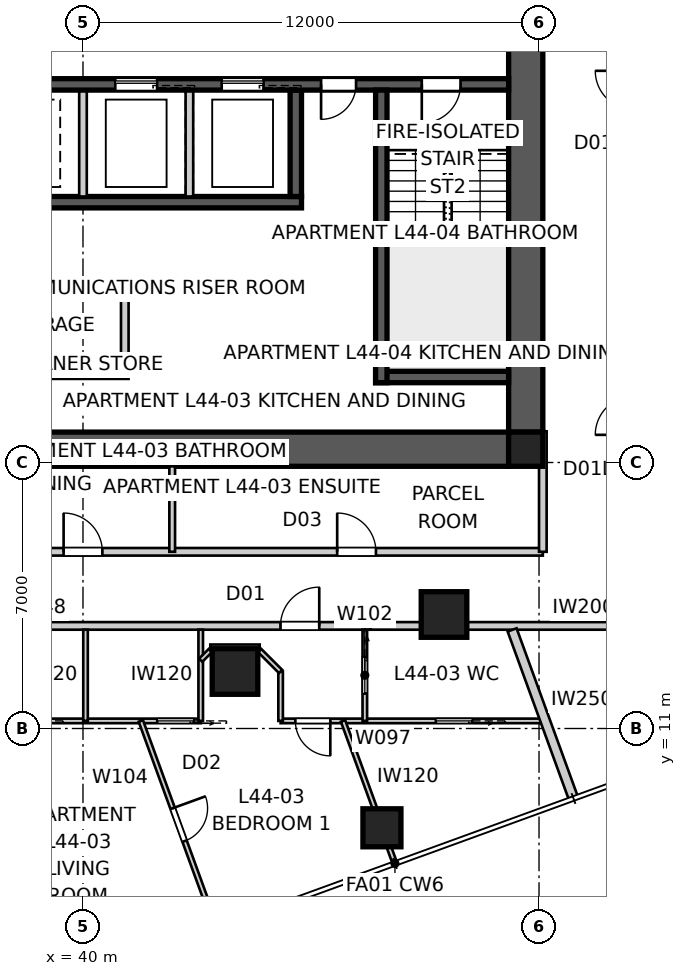
"""IFC4 building model, lengths in metres.
Left out: names, types, materials, properties, quantities, classifications, styles, units other than length and angle.
Written with IfcOpenShell. Run it as: python <this file> out.ifc"""

import sys

from ifc_helpers import new_model, si_unit, direction, frame, frame_2d, origin, origin_2d, place, context, subcontext, project, spatial, polyline, rectangle, outline, extrude, element, fill, save


model = new_model("IFC4")
c1 = context("Model", 3, precision=1e-05, world=origin(), true_north=direction((0.0, 1.0)))
c2 = subcontext(c1, "Body", "Model", "MODEL_VIEW")
j1 = project(units=[si_unit("LENGTHUNIT", "METRE"), si_unit("PLANEANGLEUNIT", "RADIAN")], contexts=[c1])
p1 = place(None, origin())
s1 = spatial("IfcSite", under=j1, at=p1, CompositionType="ELEMENT")
p2 = place(p1, origin())
s2 = spatial("IfcBuilding", under=s1, at=p2, CompositionType="ELEMENT")
p3 = place(p2, frame((0.0, 0.0, 160.8)))
s3 = spatial("IfcBuildingStorey", under=s2, at=p3, CompositionType="ELEMENT", Elevation=160.8)
p4 = place(p3, frame((51.2, 18.35, 0.0), z_axis=(0.0, 0.0, 1.0), x_axis=(-1.0, 0.0, 0.0)))
e1 = element("IfcWall", 1, at=p4, inside=s3, PredefinedType="SHEAR", context=c2, shape_type="SweptSolid", body=[
    extrude(outline(polyline([(0.0, -0.45), (22.4, -0.45), (22.4, -0.025), (22.85, -0.025), (22.85, 0.025), (22.4, 0.025), (22.4, 0.45), (0.0, 0.45), (0.0, 0.025), (-0.45, 0.025), (-0.45, -0.025), (0.0, -0.025), (0.0, -0.45)])), origin(), (0.0, 0.0, 1.0), 3.4),
])
p5 = place(p3, frame((51.65, 18.8, 0.0), z_axis=(0.0, 0.0, 1.0), x_axis=(0.0, 1.0, 0.0)))
e2 = element("IfcWall", 2, at=p5, inside=s3, PredefinedType="SHEAR", context=c2, shape_type="SweptSolid", body=[
    extrude(outline(polyline([(0.0, -0.45), (22.4, -0.45), (22.4, -0.025), (22.85, -0.025), (22.85, 0.025), (22.4, 0.025), (22.4, 0.45), (0.0, 0.45), (0.0, 0.025), (-0.45, 0.025), (-0.45, -0.025), (0.0, -0.025), (0.0, -0.45)])), origin(), (0.0, 0.0, 1.0), 3.4),
])
p6 = place(p5, frame((11.14, 0.0, 0.0)))
e3 = element("IfcOpeningElement", 3, at=p6, cuts=e2, PredefinedType="OPENING", context=c2, shape_type="SweptSolid", body=[
    extrude(rectangle(XDim=1.02, YDim=2.4, at=frame_2d((0.51, 1.2))), frame((0.0, 0.46, 0.0), z_axis=(0.0, -1.0, 0.0), x_axis=(1.0, 0.0, 0.0)), (0.0, 0.0, 1.0), 0.92),
])
p7 = place(p3, frame((51.2, 27.95, 0.0), z_axis=(0.0, 0.0, 1.0), x_axis=(-1.0, 0.0, 0.0)))
e4 = element("IfcWall", 4, at=p7, inside=s3, PredefinedType="SHEAR", context=c2, shape_type="SweptSolid", body=[
    extrude(rectangle(XDim=22.4, YDim=0.3, at=frame_2d((11.2, 0.0))), origin(), (0.0, 0.0, 1.0), 3.4),
])
p8 = place(p7, frame((19.04, 0.0, 0.0)))
e5 = element("IfcOpeningElement", 5, at=p8, cuts=e4, PredefinedType="OPENING", context=c2, shape_type="SweptSolid", body=[
    extrude(rectangle(XDim=0.92, YDim=2.1, at=frame_2d((0.46, 1.05))), frame((0.0, 0.16, 0.0), z_axis=(0.0, -1.0, 0.0), x_axis=(1.0, 0.0, 0.0)), (0.0, 0.0, 1.0), 0.32),
])
p9 = place(p7, frame((1.265, 0.0, 0.0)))
e6 = element("IfcOpeningElement", 6, at=p9, cuts=e4, PredefinedType="OPENING", context=c2, shape_type="SweptSolid", body=[
    extrude(rectangle(XDim=1.02, YDim=2.1, at=frame_2d((0.51, 1.05))), frame((0.0, 0.16, 0.0), z_axis=(0.0, -1.0, 0.0), x_axis=(1.0, 0.0, 0.0)), (0.0, 0.0, 1.0), 0.32),
])
p10 = place(p7, frame((4.015, 0.0, 0.0)))
e7 = element("IfcOpeningElement", 7, at=p10, cuts=e4, PredefinedType="OPENING", context=c2, shape_type="SweptSolid", body=[
    extrude(rectangle(XDim=0.92, YDim=2.1, at=frame_2d((0.46, 1.05))), frame((0.0, 0.16, 0.0), z_axis=(0.0, -1.0, 0.0), x_axis=(1.0, 0.0, 0.0)), (0.0, 0.0, 1.0), 0.32),
])
p11 = place(p7, frame((6.45, 0.0, 0.0)))
e8 = element("IfcOpeningElement", 8, at=p11, cuts=e4, PredefinedType="OPENING", context=c2, shape_type="SweptSolid", body=[
    extrude(rectangle(XDim=1.1, YDim=2.1, at=frame_2d((0.55, 1.05))), frame((0.0, 0.16, 0.0), z_axis=(0.0, -1.0, 0.0), x_axis=(1.0, 0.0, 0.0)), (0.0, 0.0, 1.0), 0.32),
])
p12 = place(p7, frame((9.25, 0.0, 0.0)))
e9 = element("IfcOpeningElement", 9, at=p12, cuts=e4, PredefinedType="OPENING", context=c2, shape_type="SweptSolid", body=[
    extrude(rectangle(XDim=1.1, YDim=2.1, at=frame_2d((0.55, 1.05))), frame((0.0, 0.16, 0.0), z_axis=(0.0, -1.0, 0.0), x_axis=(1.0, 0.0, 0.0)), (0.0, 0.0, 1.0), 0.32),
])
p13 = place(p7, frame((14.85, 0.0, 0.0)))
e10 = element("IfcOpeningElement", 10, at=p13, cuts=e4, PredefinedType="OPENING", context=c2, shape_type="SweptSolid", body=[
    extrude(rectangle(XDim=1.1, YDim=2.1, at=frame_2d((0.55, 1.05))), frame((0.0, 0.16, 0.0), z_axis=(0.0, -1.0, 0.0), x_axis=(1.0, 0.0, 0.0)), (0.0, 0.0, 1.0), 0.32),
])
p14 = place(p3, frame((45.75, 24.85, 0.0), z_axis=(0.0, 0.0, 1.0), x_axis=(-1.0, 0.0, 0.0)))
e11 = element("IfcWall", 11, at=p14, inside=s3, PredefinedType="SHEAR", context=c2, shape_type="SweptSolid", body=[
    extrude(rectangle(XDim=11.5, YDim=0.3, at=frame_2d((5.75, 0.0))), origin(), (0.0, 0.0, 1.0), 3.4),
])
p15 = place(p3, frame((45.6, 27.8, 0.0), z_axis=(0.0, 0.0, 1.0), x_axis=(0.0, -1.0, 0.0)))
e12 = element("IfcWall", 12, at=p15, inside=s3, PredefinedType="SHEAR", context=c2, shape_type="SweptSolid", body=[
    extrude(rectangle(XDim=2.8, YDim=0.3, at=frame_2d((1.4, 0.0))), origin(), (0.0, 0.0, 1.0), 3.4),
])
for number, where, z_axis, x_axis in (
    (13, (42.8, 27.8, 0.0), (0.0, 0.0, 1.0), (0.0, -1.0, 0.0)),
    (14, (40.0, 27.8, 0.0), (0.0, 0.0, 1.0), (0.0, -1.0, 0.0)),
):
    element("IfcWall", number, at=place(p3, frame(where, z_axis=z_axis, x_axis=x_axis)), inside=s3, PredefinedType="SOLIDWALL", context=c2, shape_type="SweptSolid", body=[
        extrude(rectangle(XDim=2.8, YDim=0.2, at=frame_2d((1.4, 0.0))), origin(), (0.0, 0.0, 1.0), 3.4),
    ])
p16 = place(p3, frame((47.85, 27.8, 0.0), z_axis=(0.0, 0.0, 1.0), x_axis=(0.0, -1.0, 0.0)))
e15 = element("IfcWall", 15, at=p16, inside=s3, PredefinedType="SHEAR", context=c2, shape_type="SweptSolid", body=[
    extrude(rectangle(XDim=7.7, YDim=0.3, at=frame_2d((3.85, 0.0))), origin(), (0.0, 0.0, 1.0), 3.4),
])
p17 = place(p3, frame((51.2, 20.25, 0.0), z_axis=(0.0, 0.0, 1.0), x_axis=(-1.0, 0.0, 0.0)))
e16 = element("IfcWall", 16, at=p17, inside=s3, PredefinedType="SHEAR", context=c2, shape_type="SweptSolid", body=[
    extrude(rectangle(XDim=3.5, YDim=0.3, at=frame_2d((1.75, 0.0))), origin(), (0.0, 0.0, 1.0), 3.4),
])
p18 = place(p3, frame((41.1, 22.4, 0.0), z_axis=(0.0, 0.0, 1.0), x_axis=(0.0, -1.0, 0.0)))
e17 = element("IfcWall", 17, at=p18, inside=s3, PredefinedType="SOLIDWALL", context=c2, shape_type="SweptSolid", body=[
    extrude(rectangle(XDim=2.0, YDim=0.2, at=frame_2d((1.0, 0.0))), origin(), (0.0, 0.0, 1.0), 3.4),
])
for number, where, z_axis, x_axis in (
    (18, (38.8, 22.5, 0.0), (0.0, 0.0, 1.0), (1.0, 0.0, 0.0)),
    (19, (38.8, 20.3, 0.0), (0.0, 0.0, 1.0), (1.0, 0.0, 0.0)),
):
    element("IfcWall", number, at=place(p3, frame(where, z_axis=z_axis, x_axis=x_axis)), inside=s3, PredefinedType="SOLIDWALL", context=c2, shape_type="SweptSolid", body=[
        extrude(rectangle(XDim=2.4, YDim=0.2, at=frame_2d((1.2, 0.0))), origin(), (0.0, 0.0, 1.0), 3.4),
    ])
p19 = place(p3, frame((51.65, 18.35, 0.0), z_axis=(0.0, 0.0, 1.0), x_axis=(1.0, 0.0, 0.0)))
e20 = element("IfcColumn", 20, at=p19, inside=s3, PredefinedType="COLUMN", context=c2, shape_type="SweptSolid", body=[
    extrude(rectangle(XDim=0.9, YDim=0.9, at=origin_2d()), origin(), (0.0, 0.0, 1.0), 3.4),
])
p20 = place(p3, frame((47.866, 8.387, 0.0), z_axis=(0.0, 0.0, 1.0), x_axis=(1.0, 0.0, 0.0)))
e21 = element("IfcColumn", 21, at=p20, inside=s3, PredefinedType="COLUMN", context=c2, shape_type="SweptSolid", body=[
    extrude(rectangle(XDim=1.0, YDim=1.0, at=origin_2d()), origin(), (0.0, 0.0, 1.0), 3.4),
])
for number, where, z_axis, x_axis in (
    (22, (44.0, 12.5, 0.0), (0.0, 0.0, 1.0), (1.0, 0.0, 0.0)),
    (23, (49.5, 14.0, 0.0), (0.0, 0.0, 1.0), (1.0, 0.0, 0.0)),
):
    element("IfcColumn", number, at=place(p3, frame(where, z_axis=z_axis, x_axis=x_axis)), inside=s3, PredefinedType="COLUMN", context=c2, shape_type="SweptSolid", body=[
        extrude(rectangle(XDim=1.2, YDim=1.2, at=origin_2d()), origin(), (0.0, 0.0, 1.0), 3.4),
    ])
p21 = place(p3, frame((32.442, 13.7, 0.0), z_axis=(0.0, 0.0, 1.0), x_axis=(1.0, 0.0, 0.0)))
e24 = element("IfcWall", 24, at=p21, inside=s3, PredefinedType="PARTITIONING", context=c2, shape_type="SweptSolid", body=[
    extrude(rectangle(XDim=15.117, YDim=0.2, at=frame_2d((7.558, 0.0))), origin(), (0.0, 0.0, 1.0), 3.25),
])
p22 = place(p21, frame((12.755, 0.0, 0.0)))
e25 = element("IfcOpeningElement", 25, at=p22, cuts=e24, PredefinedType="OPENING", context=c2, shape_type="SweptSolid", body=[
    extrude(rectangle(XDim=1.02, YDim=2.34, at=frame_2d((0.51, 1.17))), frame((0.0, 0.11, 0.0), z_axis=(0.0, -1.0, 0.0), x_axis=(1.0, 0.0, 0.0)), (0.0, 0.0, 1.0), 0.22),
])
p23 = place(p3, frame((47.558, 13.7, 0.0), z_axis=(0.0, 0.0, 1.0), x_axis=(1.0, 0.0, 0.0)))
e26 = element("IfcWall", 26, at=p23, inside=s3, PredefinedType="PARTITIONING", context=c2, shape_type="SweptSolid", body=[
    extrude(rectangle(XDim=1.683, YDim=0.2, at=frame_2d((0.842, 0.0))), origin(), (0.0, 0.0, 1.0), 2.55),
])
p24 = place(p3, frame((49.242, 13.7, 0.0), z_axis=(0.0, 0.0, 1.0), x_axis=(1.0, 0.0, 0.0)))
e27 = element("IfcWall", 27, at=p24, inside=s3, PredefinedType="PARTITIONING", context=c2, shape_type="SweptSolid", body=[
    extrude(rectangle(XDim=5.258, YDim=0.2, at=frame_2d((2.629, 0.0))), origin(), (0.0, 0.0, 1.0), 3.25),
])
p25 = place(p3, frame((52.907, 9.157, 0.0), z_axis=(0.0, 0.0, 1.0), x_axis=(-0.342012883883, 0.939695262975, 0.0)))
e28 = element("IfcWall", 28, at=p25, inside=s3, PredefinedType="PARTITIONING", context=c2, shape_type="SweptSolid", body=[
    extrude(rectangle(XDim=4.722, YDim=0.25, at=frame_2d((2.361, 0.0))), origin(), (0.0, 0.0, 1.0), 3.25),
])
p26 = place(p3, frame((27.9, 15.65, 0.0), z_axis=(0.0, 0.0, 1.0), x_axis=(1.0, 0.0, 0.0)))
e29 = element("IfcWall", 29, at=p26, inside=s3, PredefinedType="PARTITIONING", context=c2, shape_type="SweptSolid", body=[
    extrude(rectangle(XDim=24.2, YDim=0.2, at=frame_2d((12.1, 0.0))), origin(), (0.0, 0.0, 1.0), 3.25),
])
p27 = place(p26, frame((4.391, 0.0, 0.0)))
e30 = element("IfcOpeningElement", 30, at=p27, cuts=e29, PredefinedType="OPENING", context=c2, shape_type="SweptSolid", body=[
    extrude(rectangle(XDim=1.02, YDim=2.1, at=frame_2d((0.51, 1.05))), frame((0.0, 0.11, 0.0), z_axis=(0.0, -1.0, 0.0), x_axis=(1.0, 0.0, 0.0)), (0.0, 0.0, 1.0), 0.22),
])
p28 = place(p26, frame((18.789, 0.0, 0.0)))
e31 = element("IfcOpeningElement", 31, at=p28, cuts=e29, PredefinedType="OPENING", context=c2, shape_type="SweptSolid", body=[
    extrude(rectangle(XDim=1.02, YDim=2.1, at=frame_2d((0.51, 1.05))), frame((0.0, 0.11, 0.0), z_axis=(0.0, -1.0, 0.0), x_axis=(1.0, 0.0, 0.0)), (0.0, 0.0, 1.0), 0.22),
])
p29 = place(p26, frame((11.59, 0.0, 0.0)))
e32 = element("IfcOpeningElement", 32, at=p29, cuts=e29, PredefinedType="OPENING", context=c2, shape_type="SweptSolid", body=[
    extrude(rectangle(XDim=1.02, YDim=2.1, at=frame_2d((0.51, 1.05))), frame((0.0, 0.11, 0.0), z_axis=(0.0, -1.0, 0.0), x_axis=(1.0, 0.0, 0.0)), (0.0, 0.0, 1.0), 0.22),
])
p30 = place(p3, frame((52.1, 15.65, 0.0), z_axis=(0.0, 0.0, 1.0), x_axis=(0.0, 1.0, 0.0)))
e33 = element("IfcWall", 33, at=p30, inside=s3, PredefinedType="PARTITIONING", context=c2, shape_type="SweptSolid", body=[
    extrude(rectangle(XDim=3.17, YDim=0.2, at=frame_2d((1.585, 0.0))), origin(), (0.0, 0.0, 1.0), 3.25),
])
p31 = place(p3, frame((42.347, 15.65, 0.0), z_axis=(0.0, 0.0, 1.0), x_axis=(0.0, 1.0, 0.0)))
e34 = element("IfcWall", 34, at=p31, inside=s3, PredefinedType="SOLIDWALL", context=c2, shape_type="SweptSolid", body=[
    extrude(rectangle(XDim=2.25, YDim=0.15, at=frame_2d((1.125, 0.0))), origin(), (0.0, 0.0, 1.0), 3.25),
])
p32 = place(p3, frame((43.098, 11.2, 0.0), z_axis=(0.0, 0.0, 1.0), x_axis=(-1.0, 0.0, 0.0)))
e35 = element("IfcWall", 35, at=p32, inside=s3, PredefinedType="PARTITIONING", context=c2, shape_type="SweptSolid", body=[
    extrude(rectangle(XDim=20.098, YDim=0.12, at=frame_2d((10.049, 0.0))), origin(), (0.0, 0.0, 1.0), 3.25),
])
p33 = place(p32, frame((15.701, 0.0, 0.0)))
e36 = element("IfcOpeningElement", 36, at=p33, cuts=e35, PredefinedType="OPENING", context=c2, shape_type="SweptSolid", body=[
    extrude(rectangle(XDim=0.92, YDim=2.34, at=frame_2d((0.46, 1.17))), frame((0.0, 0.07, 0.0), z_axis=(0.0, -1.0, 0.0), x_axis=(1.0, 0.0, 0.0)), (0.0, 0.0, 1.0), 0.14),
])
p34 = place(p32, frame((8.49, 0.0, 0.0)))
e37 = element("IfcOpeningElement", 37, at=p34, cuts=e35, PredefinedType="OPENING", context=c2, shape_type="SweptSolid", body=[
    extrude(rectangle(XDim=0.96, YDim=2.1, at=frame_2d((0.48, 1.05))), frame((0.0, 0.07, 0.0), z_axis=(0.0, -1.0, 0.0), x_axis=(1.0, 0.0, 0.0)), (0.0, 0.0, 1.0), 0.14),
])
p35 = place(p32, frame((0.185, 0.0, 0.0)))
e38 = element("IfcOpeningElement", 38, at=p35, cuts=e35, PredefinedType="OPENING", context=c2, shape_type="SweptSolid", body=[
    extrude(rectangle(XDim=0.96, YDim=2.1, at=frame_2d((0.48, 1.05))), frame((0.0, 0.07, 0.0), z_axis=(0.0, -1.0, 0.0), x_axis=(1.0, 0.0, 0.0)), (0.0, 0.0, 1.0), 0.14),
])
p36 = place(p32, frame((4.484, 0.0, 0.0)))
e39 = element("IfcOpeningElement", 39, at=p36, cuts=e35, PredefinedType="OPENING", context=c2, shape_type="SweptSolid", body=[
    extrude(rectangle(XDim=0.96, YDim=2.1, at=frame_2d((0.48, 1.05))), frame((0.0, 0.07, 0.0), z_axis=(0.0, -1.0, 0.0), x_axis=(1.0, 0.0, 0.0)), (0.0, 0.0, 1.0), 0.14),
])
p37 = place(p3, frame((43.098, 11.2, 0.0), z_axis=(0.0, 0.0, 1.0), x_axis=(0.0, 1.0, 0.0)))
e40 = element("IfcWall", 40, at=p37, inside=s3, PredefinedType="PARTITIONING", context=c2, shape_type="SweptSolid", body=[
    extrude(rectangle(XDim=2.4, YDim=0.12, at=frame_2d((1.2, 0.0))), origin(), (0.0, 0.0, 1.0), 3.25),
])
p38 = place(p3, frame((52.164, 11.2, 0.0), z_axis=(0.0, 0.0, 1.0), x_axis=(-1.0, 0.0, 0.0)))
e41 = element("IfcWall", 41, at=p38, inside=s3, PredefinedType="PARTITIONING", context=c2, shape_type="SweptSolid", body=[
    extrude(rectangle(XDim=6.964, YDim=0.12, at=frame_2d((3.482, 0.0))), origin(), (0.0, 0.0, 1.0), 3.25),
])
p39 = place(p38, frame((5.656, 0.0, 0.0)))
e42 = element("IfcOpeningElement", 42, at=p39, cuts=e41, PredefinedType="OPENING", context=c2, shape_type="SweptSolid", body=[
    extrude(rectangle(XDim=0.92, YDim=2.34, at=frame_2d((0.46, 1.17))), frame((0.0, 0.07, 0.0), z_axis=(0.0, -1.0, 0.0), x_axis=(1.0, 0.0, 0.0)), (0.0, 0.0, 1.0), 0.14),
])
p40 = place(p38, frame((1.919, 0.0, 0.0)))
e43 = element("IfcOpeningElement", 43, at=p40, cuts=e41, PredefinedType="OPENING", context=c2, shape_type="SweptSolid", body=[
    extrude(rectangle(XDim=0.96, YDim=2.1, at=frame_2d((0.48, 1.05))), frame((0.0, 0.07, 0.0), z_axis=(0.0, -1.0, 0.0), x_axis=(1.0, 0.0, 0.0)), (0.0, 0.0, 1.0), 0.14),
])
p41 = place(p3, frame((45.2, 11.2, 0.0), z_axis=(0.0, 0.0, 1.0), x_axis=(0.0, 1.0, 0.0)))
e44 = element("IfcWall", 44, at=p41, inside=s3, PredefinedType="PARTITIONING", context=c2, shape_type="SweptSolid", body=[
    extrude(rectangle(XDim=1.3, YDim=0.12, at=frame_2d((0.65, 0.0))), origin(), (0.0, 0.0, 1.0), 3.25),
])
p42 = place(p3, frame((45.2, 12.5, 0.0), z_axis=(0.0, 0.0, 1.0), x_axis=(-0.707106781187, 0.707106781187, 0.0)))
e45 = element("IfcWall", 45, at=p42, inside=s3, PredefinedType="PARTITIONING", context=c2, shape_type="SweptSolid", body=[
    extrude(rectangle(XDim=0.778, YDim=0.12, at=frame_2d((0.389, 0.0))), origin(), (0.0, 0.0, 1.0), 3.25),
])
p43 = place(p3, frame((44.65, 13.15, 0.0), z_axis=(0.0, 0.0, 1.0), x_axis=(-1.0, 0.0, 0.0)))
e46 = element("IfcWall", 46, at=p43, inside=s3, PredefinedType="PARTITIONING", context=c2, shape_type="SweptSolid", body=[
    extrude(rectangle(XDim=1.3, YDim=0.12, at=frame_2d((0.65, 0.0))), origin(), (0.0, 0.0, 1.0), 3.25),
])
p44 = place(p3, frame((43.35, 13.05, 0.0), z_axis=(0.0, 0.0, 1.0), x_axis=(-0.707106781187, -0.707106781187, 0.0)))
e47 = element("IfcWall", 47, at=p44, inside=s3, PredefinedType="PARTITIONING", context=c2, shape_type="SweptSolid", body=[
    extrude(rectangle(XDim=0.357, YDim=0.12, at=frame_2d((0.178, 0.0))), origin(), (0.0, 0.0, 1.0), 3.25),
])
p45 = place(p3, frame((47.416, 13.6, 0.0), z_axis=(0.0, 0.0, 1.0), x_axis=(0.0, -1.0, 0.0)))
e48 = element("IfcWall", 48, at=p45, inside=s3, PredefinedType="PARTITIONING", context=c2, shape_type="SweptSolid", body=[
    extrude(rectangle(XDim=2.4, YDim=0.12, at=frame_2d((1.2, 0.0))), origin(), (0.0, 0.0, 1.0), 3.25),
])
p46 = place(p45, frame((0.72, 0.0, 0.0)))
e49 = element("IfcOpeningElement", 49, at=p46, cuts=e48, PredefinedType="OPENING", context=c2, shape_type="SweptSolid", body=[
    extrude(rectangle(XDim=0.96, YDim=2.1, at=frame_2d((0.48, 1.05))), frame((0.0, 0.07, 0.0), z_axis=(0.0, -1.0, 0.0), x_axis=(1.0, 0.0, 0.0)), (0.0, 0.0, 1.0), 0.14),
])
p47 = place(p3, frame((40.067, 13.6, 0.0), z_axis=(0.0, 0.0, 1.0), x_axis=(0.0, -1.0, 0.0)))
e50 = element("IfcWall", 50, at=p47, inside=s3, PredefinedType="PARTITIONING", context=c2, shape_type="SweptSolid", body=[
    extrude(rectangle(XDim=2.4, YDim=0.12, at=frame_2d((1.2, 0.0))), origin(), (0.0, 0.0, 1.0), 2.796),
])
p48 = place(p3, frame((41.522, 11.2, 0.0), z_axis=(0.0, 0.0, 1.0), x_axis=(0.342028262279, -0.939689665689, 0.0)))
e51 = element("IfcWall", 51, at=p48, inside=s3, PredefinedType="PARTITIONING", context=c2, shape_type="SweptSolid", body=[
    extrude(rectangle(XDim=5.773, YDim=0.12, at=frame_2d((2.887, 0.0))), origin(), (0.0, 0.0, 1.0), 3.25),
])
p49 = place(p48, frame((2.447, 0.0, 0.0)))
e52 = element("IfcOpeningElement", 52, at=p49, cuts=e51, PredefinedType="OPENING", context=c2, shape_type="SweptSolid", body=[
    extrude(rectangle(XDim=0.92, YDim=2.34, at=frame_2d((0.46, 1.17))), frame((0.0, 0.07, 0.0), z_axis=(0.0, -1.0, 0.0), x_axis=(1.0, 0.0, 0.0)), (0.0, 0.0, 1.0), 0.14),
])
p50 = place(p3, frame((46.843, 11.2, 0.0), z_axis=(0.0, 0.0, 1.0), x_axis=(0.341990966768, -0.939703239672, 0.0)))
e53 = element("IfcWall", 53, at=p50, inside=s3, PredefinedType="PARTITIONING", context=c2, shape_type="SweptSolid", body=[
    extrude(rectangle(XDim=3.953, YDim=0.12, at=frame_2d((1.977, 0.0))), origin(), (0.0, 0.0, 1.0), 3.25),
])
p51 = place(p9, origin())
e54 = element("IfcDoor", 54, at=p51, inside=s3, OperationType="SINGLE_SWING_RIGHT", PredefinedType="DOOR", context=c2, shape_type="SweptSolid", body=[
    extrude(rectangle(XDim=1.02, YDim=2.1, at=frame_2d((0.51, 1.05))), frame((0.0, 0.025, 0.0), z_axis=(0.0, -1.0, 0.0), x_axis=(1.0, 0.0, 0.0)), (0.0, 0.0, 1.0), 0.05),
])
fill(e6, e54)
p52 = place(p10, origin())
e55 = element("IfcDoor", 55, at=p52, inside=s3, OperationType="SINGLE_SWING_RIGHT", PredefinedType="DOOR", context=c2, shape_type="SweptSolid", body=[
    extrude(rectangle(XDim=0.92, YDim=2.1, at=frame_2d((0.46, 1.05))), frame((0.0, 0.025, 0.0), z_axis=(0.0, -1.0, 0.0), x_axis=(1.0, 0.0, 0.0)), (0.0, 0.0, 1.0), 0.05),
])
fill(e7, e55)
p53 = place(p28, origin())
e56 = element("IfcDoor", 56, at=p53, inside=s3, OperationType="SINGLE_SWING_LEFT", PredefinedType="DOOR", context=c2, shape_type="SweptSolid", body=[
    extrude(rectangle(XDim=1.02, YDim=2.1, at=frame_2d((0.51, 1.05))), frame((0.0, 0.025, 0.0), z_axis=(0.0, -1.0, 0.0), x_axis=(1.0, 0.0, 0.0)), (0.0, 0.0, 1.0), 0.05),
])
fill(e31, e56)
p54 = place(p22, origin())
e57 = element("IfcDoor", 57, at=p54, inside=s3, OperationType="SINGLE_SWING_RIGHT", PredefinedType="DOOR", context=c2, shape_type="SweptSolid", body=[
    extrude(rectangle(XDim=1.02, YDim=2.34, at=frame_2d((0.51, 1.17))), frame((0.0, 0.025, 0.0), z_axis=(0.0, -1.0, 0.0), x_axis=(1.0, 0.0, 0.0)), (0.0, 0.0, 1.0), 0.05),
])
fill(e25, e57)
p55 = place(p29, origin())
e58 = element("IfcDoor", 58, at=p55, inside=s3, OperationType="SINGLE_SWING_LEFT", PredefinedType="DOOR", context=c2, shape_type="SweptSolid", body=[
    extrude(rectangle(XDim=1.02, YDim=2.1, at=frame_2d((0.51, 1.05))), frame((0.0, 0.025, 0.0), z_axis=(0.0, -1.0, 0.0), x_axis=(1.0, 0.0, 0.0)), (0.0, 0.0, 1.0), 0.05),
])
fill(e32, e58)
p56 = place(p46, origin())
e59 = element("IfcDoor", 59, at=p56, inside=s3, OperationType="SLIDING_TO_LEFT", PredefinedType="DOOR", context=c2, shape_type="SweptSolid", body=[
    extrude(rectangle(XDim=0.96, YDim=2.1, at=frame_2d((0.48, 1.05))), frame((0.0, 0.025, 0.0), z_axis=(0.0, -1.0, 0.0), x_axis=(1.0, 0.0, 0.0)), (0.0, 0.0, 1.0), 0.05),
])
fill(e49, e59)
p57 = place(p39, origin())
e60 = element("IfcDoor", 60, at=p57, inside=s3, OperationType="SINGLE_SWING_LEFT", PredefinedType="DOOR", context=c2, shape_type="SweptSolid", body=[
    extrude(rectangle(XDim=0.92, YDim=2.34, at=frame_2d((0.46, 1.17))), frame((0.0, 0.025, 0.0), z_axis=(0.0, -1.0, 0.0), x_axis=(1.0, 0.0, 0.0)), (0.0, 0.0, 1.0), 0.05),
])
fill(e42, e60)
p58 = place(p40, origin())
e61 = element("IfcDoor", 61, at=p58, inside=s3, OperationType="SLIDING_TO_LEFT", PredefinedType="DOOR", context=c2, shape_type="SweptSolid", body=[
    extrude(rectangle(XDim=0.96, YDim=2.1, at=frame_2d((0.48, 1.05))), frame((0.0, 0.025, 0.0), z_axis=(0.0, -1.0, 0.0), x_axis=(1.0, 0.0, 0.0)), (0.0, 0.0, 1.0), 0.05),
])
fill(e43, e61)
p59 = place(p49, origin())
e62 = element("IfcDoor", 62, at=p59, inside=s3, OperationType="SINGLE_SWING_LEFT", PredefinedType="DOOR", context=c2, shape_type="SweptSolid", body=[
    extrude(rectangle(XDim=0.92, YDim=2.34, at=frame_2d((0.46, 1.17))), frame((0.0, 0.025, 0.0), z_axis=(0.0, -1.0, 0.0), x_axis=(1.0, 0.0, 0.0)), (0.0, 0.0, 1.0), 0.05),
])
fill(e52, e62)
p60 = place(p35, origin())
e63 = element("IfcDoor", 63, at=p60, inside=s3, OperationType="SLIDING_TO_LEFT", PredefinedType="DOOR", context=c2, shape_type="SweptSolid", body=[
    extrude(rectangle(XDim=0.96, YDim=2.1, at=frame_2d((0.48, 1.05))), frame((0.0, 0.025, 0.0), z_axis=(0.0, -1.0, 0.0), x_axis=(1.0, 0.0, 0.0)), (0.0, 0.0, 1.0), 0.05),
])
fill(e38, e63)
p61 = place(p11, origin())
e64 = element("IfcDoor", 64, at=p61, inside=s3, OperationType="SLIDING_TO_LEFT", PredefinedType="DOOR", context=c2, shape_type="SweptSolid", body=[
    extrude(rectangle(XDim=1.1, YDim=2.1, at=frame_2d((0.55, 1.05))), frame((0.0, 0.025, 0.0), z_axis=(0.0, -1.0, 0.0), x_axis=(1.0, 0.0, 0.0)), (0.0, 0.0, 1.0), 0.05),
])
fill(e8, e64)
p62 = place(p12, origin())
e65 = element("IfcDoor", 65, at=p62, inside=s3, OperationType="SLIDING_TO_LEFT", PredefinedType="DOOR", context=c2, shape_type="SweptSolid", body=[
    extrude(rectangle(XDim=1.1, YDim=2.1, at=frame_2d((0.55, 1.05))), frame((0.0, 0.025, 0.0), z_axis=(0.0, -1.0, 0.0), x_axis=(1.0, 0.0, 0.0)), (0.0, 0.0, 1.0), 0.05),
])
fill(e9, e65)
save(model, sys.argv[1])
